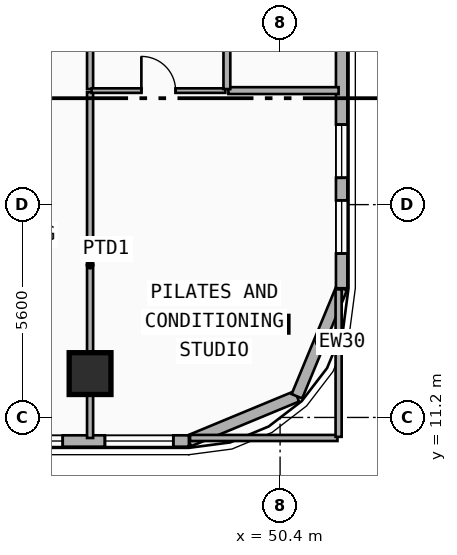
"""IFC4 building model, lengths in metres.
Left out: names, types, materials, properties, quantities, classifications, styles, units other than length and angle.
Written with IfcOpenShell. Run it as: python <this file> out.ifc"""

import sys

from ifc_helpers import new_model, si_unit, direction, frame, frame_2d, origin, origin_2d, place, context, subcontext, project, spatial, rectangle, i_section, extrude, element, fill, save


model = new_model("IFC4")
c1 = context("Model", 3, precision=1e-05, world=origin(), true_north=direction((0.0, 1.0)))
c2 = subcontext(c1, "Body", "Model", "MODEL_VIEW")
j1 = project(units=[si_unit("LENGTHUNIT", "METRE"), si_unit("PLANEANGLEUNIT", "RADIAN")], contexts=[c1])
p1 = place(None, origin())
s1 = spatial("IfcSite", under=j1, at=p1, CompositionType="ELEMENT")
p2 = place(p1, origin())
s2 = spatial("IfcBuilding", under=s1, at=p2, CompositionType="ELEMENT")
p3 = place(p2, frame((0.0, 0.0, 151.9)))
s3 = spatial("IfcBuildingStorey", under=s2, at=p3, CompositionType="ELEMENT", Elevation=151.9)
p4 = place(p3, frame((45.4, 12.463, 0.0), z_axis=(0.0, -0.0902702026, 0.995917311087), x_axis=(1.0, 0.0, 0.0)))
e1 = element("IfcColumn", 1, at=p4, inside=s3, PredefinedType="COLUMN", context=c2, shape_type="SweptSolid", body=[
    extrude(rectangle(XDim=1.1, YDim=1.1, at=origin_2d()), origin(), (0.0, 0.0, 1.0), 3.565),
])
p5 = place(p3, frame((50.4, 13.75, 0.0), z_axis=(0.0, -0.079930493943, 0.996800439475), x_axis=(1.0, 0.0, 0.0)))
e2 = element("IfcColumn", 2, at=p5, inside=s3, PredefinedType="COLUMN", context=c2, shape_type="SweptSolid", body=[
    extrude(i_section(OverallWidth=0.413, OverallDepth=0.415, WebThickness=0.03, FlangeThickness=0.047, FilletRadius=0.015, at=origin_2d()), origin(), (0.0, 0.0, 1.0), 3.562),
])
p6 = place(p3, frame((50.843, 11.757, 0.0), z_axis=(0.0, 0.0, 1.0), x_axis=(-0.92389884758, -0.382636798336, 0.0)))
e3 = element("IfcWall", 3, at=p6, inside=s3, PredefinedType="SOLIDWALL", context=c2, shape_type="SweptSolid", body=[
    extrude(rectangle(XDim=3.077, YDim=0.3, at=frame_2d((1.538, 0.0))), origin(), (0.0, 0.0, 1.0), 3.29),
])
p7 = place(p3, frame((52.02, 14.6, 0.0), z_axis=(0.0, 0.0, 1.0), x_axis=(-0.382676475685, -0.923882414032, 0.0)))
e4 = element("IfcWall", 4, at=p7, inside=s3, PredefinedType="SOLIDWALL", context=c2, shape_type="SweptSolid", body=[
    extrude(rectangle(XDim=3.077, YDim=0.3, at=frame_2d((1.539, 0.0))), origin(), (0.0, 0.0, 1.0), 3.29),
])
p8 = place(p3, frame((52.02, 37.6, 0.0), z_axis=(0.0, 0.0, 1.0), x_axis=(0.0, -1.0, 0.0)))
e5 = element("IfcWall", 5, at=p8, inside=s3, PredefinedType="SOLIDWALL", context=c2, shape_type="SweptSolid", body=[
    extrude(rectangle(XDim=23.0, YDim=0.3, at=frame_2d((11.5, 0.0))), origin(), (0.0, 0.0, 1.0), 3.29),
])
p9 = place(p8, frame((2.513, 0.0, 0.34)))
e6 = element("IfcOpeningElement", 6, at=p9, cuts=e5, PredefinedType="OPENING", context=c2, shape_type="SweptSolid", body=[
    extrude(rectangle(XDim=1.4, YDim=2.1, at=frame_2d((0.7, 1.05))), frame((0.0, 0.16, 0.0), z_axis=(0.0, -1.0, 0.0), x_axis=(1.0, 0.0, 0.0)), (0.0, 0.0, 1.0), 0.32),
])
p10 = place(p8, frame((6.107, 0.0, 0.34)))
e7 = element("IfcOpeningElement", 7, at=p10, cuts=e5, PredefinedType="OPENING", context=c2, shape_type="SweptSolid", body=[
    extrude(rectangle(XDim=1.4, YDim=2.1, at=frame_2d((0.7, 1.05))), frame((0.0, 0.16, 0.0), z_axis=(0.0, -1.0, 0.0), x_axis=(1.0, 0.0, 0.0)), (0.0, 0.0, 1.0), 0.32),
])
p11 = place(p8, frame((18.693, 0.0, 0.34)))
e8 = element("IfcOpeningElement", 8, at=p11, cuts=e5, PredefinedType="OPENING", context=c2, shape_type="SweptSolid", body=[
    extrude(rectangle(XDim=1.4, YDim=2.1, at=frame_2d((0.7, 1.05))), frame((0.0, 0.16, 0.0), z_axis=(0.0, -1.0, 0.0), x_axis=(1.0, 0.0, 0.0)), (0.0, 0.0, 1.0), 0.32),
])
p12 = place(p8, frame((20.687, 0.0, 0.34)))
e9 = element("IfcOpeningElement", 9, at=p12, cuts=e5, PredefinedType="OPENING", context=c2, shape_type="SweptSolid", body=[
    extrude(rectangle(XDim=1.4, YDim=2.1, at=frame_2d((0.7, 1.05))), frame((0.0, 0.16, 0.0), z_axis=(0.0, -1.0, 0.0), x_axis=(1.0, 0.0, 0.0)), (0.0, 0.0, 1.0), 0.32),
])
p13 = place(p3, frame((48.0, 10.58, 0.0), z_axis=(0.0, 0.0, 1.0), x_axis=(-1.0, 0.0, 0.0)))
e10 = element("IfcWall", 10, at=p13, inside=s3, PredefinedType="SOLIDWALL", context=c2, shape_type="SweptSolid", body=[
    extrude(rectangle(XDim=38.4, YDim=0.3, at=frame_2d((19.2, 0.0))), origin(), (0.0, 0.0, 1.0), 3.29),
])
p14 = place(p13, frame((36.19, 0.0, 0.34)))
e11 = element("IfcOpeningElement", 11, at=p14, cuts=e10, PredefinedType="OPENING", context=c2, shape_type="SweptSolid", body=[
    extrude(rectangle(XDim=1.8, YDim=1.8, at=frame_2d((0.9, 0.9))), frame((0.0, 0.16, 0.0), z_axis=(0.0, -1.0, 0.0), x_axis=(1.0, 0.0, 0.0)), (0.0, 0.0, 1.0), 0.32),
])
p15 = place(p13, frame((33.7, 0.0, 0.34)))
e12 = element("IfcOpeningElement", 12, at=p15, cuts=e10, PredefinedType="OPENING", context=c2, shape_type="SweptSolid", body=[
    extrude(rectangle(XDim=1.8, YDim=1.8, at=frame_2d((0.9, 0.9))), frame((0.0, 0.16, 0.0), z_axis=(0.0, -1.0, 0.0), x_axis=(1.0, 0.0, 0.0)), (0.0, 0.0, 1.0), 0.32),
])
p16 = place(p13, frame((25.5, 0.0, 0.68)))
e13 = element("IfcOpeningElement", 13, at=p16, cuts=e10, PredefinedType="OPENING", context=c2, shape_type="SweptSolid", body=[
    extrude(rectangle(XDim=1.2, YDim=1.5, at=frame_2d((0.6, 0.75))), frame((0.0, 0.16, 0.0), z_axis=(0.0, -1.0, 0.0), x_axis=(1.0, 0.0, 0.0)), (0.0, 0.0, 1.0), 0.32),
])
p17 = place(p13, frame((21.15, 0.0, 0.65)))
e14 = element("IfcOpeningElement", 14, at=p17, cuts=e10, PredefinedType="OPENING", context=c2, shape_type="SweptSolid", body=[
    extrude(rectangle(XDim=2.1, YDim=2.1, at=frame_2d((1.05, 1.05))), frame((0.0, 0.16, 0.0), z_axis=(0.0, -1.0, 0.0), x_axis=(1.0, 0.0, 0.0)), (0.0, 0.0, 1.0), 0.32),
])
p18 = place(p13, frame((14.375, 0.0, 0.65)))
e15 = element("IfcOpeningElement", 15, at=p18, cuts=e10, PredefinedType="OPENING", context=c2, shape_type="SweptSolid", body=[
    extrude(rectangle(XDim=2.1, YDim=2.1, at=frame_2d((1.05, 1.05))), frame((0.0, 0.16, 0.0), z_axis=(0.0, -1.0, 0.0), x_axis=(1.0, 0.0, 0.0)), (0.0, 0.0, 1.0), 0.32),
])
p19 = place(p13, frame((3.32, 0.0, 1.05)))
e16 = element("IfcOpeningElement", 16, at=p19, cuts=e10, PredefinedType="OPENING", context=c2, shape_type="SweptSolid", body=[
    extrude(rectangle(XDim=1.2, YDim=1.5, at=frame_2d((0.6, 0.75))), frame((0.0, 0.16, 0.0), z_axis=(0.0, -1.0, 0.0), x_axis=(1.0, 0.0, 0.0)), (0.0, 0.0, 1.0), 0.32),
])
p20 = place(p13, frame((0.41, 0.0, 0.34)))
e17 = element("IfcOpeningElement", 17, at=p20, cuts=e10, PredefinedType="OPENING", context=c2, shape_type="SweptSolid", body=[
    extrude(rectangle(XDim=1.8, YDim=1.8, at=frame_2d((0.9, 0.9))), frame((0.0, 0.16, 0.0), z_axis=(0.0, -1.0, 0.0), x_axis=(1.0, 0.0, 0.0)), (0.0, 0.0, 1.0), 0.32),
])
p21 = place(p3, frame((45.4, 10.66, 0.0), z_axis=(0.0, 0.0, 1.0), x_axis=(0.0, 1.0, 0.0)))
e18 = element("IfcWall", 18, at=p21, inside=s3, PredefinedType="PARTITIONING", context=c2, shape_type="SweptSolid", body=[
    extrude(rectangle(XDim=9.1, YDim=0.16, at=frame_2d((4.55, 0.0))), origin(), (0.0, 0.0, 1.0), 2.36),
])
p22 = place(p3, frame((45.4, 19.84, 0.0), z_axis=(0.0, 0.0, 1.0), x_axis=(0.0, 1.0, 0.0)))
e19 = element("IfcWall", 19, at=p22, inside=s3, PredefinedType="PARTITIONING", context=c2, shape_type="SweptSolid", body=[
    extrude(rectangle(XDim=5.67, YDim=0.16, at=frame_2d((2.835, 0.0))), origin(), (0.0, 0.0, 1.0), 2.36),
])
p23 = place(p3, frame((45.44, 19.8, 0.0), z_axis=(0.0, 0.0, 1.0), x_axis=(1.0, 0.0, 0.0)))
e20 = element("IfcWall", 20, at=p23, inside=s3, PredefinedType="PARTITIONING", context=c2, shape_type="SweptSolid", body=[
    extrude(rectangle(XDim=3.52, YDim=0.12, at=frame_2d((1.76, 0.0))), origin(), (0.0, 0.0, 1.0), 2.36),
])
p24 = place(p23, frame((1.31, 0.0, 0.0)))
e21 = element("IfcOpeningElement", 21, at=p24, cuts=e20, PredefinedType="OPENING", context=c2, shape_type="SweptSolid", body=[
    extrude(rectangle(XDim=0.9, YDim=2.1, at=frame_2d((0.45, 1.05))), frame((0.0, 0.07, 0.0), z_axis=(0.0, -1.0, 0.0), x_axis=(1.0, 0.0, 0.0)), (0.0, 0.0, 1.0), 0.14),
])
p25 = place(p3, frame((49.04, 19.8, 0.0), z_axis=(0.0, 0.0, 1.0), x_axis=(1.0, 0.0, 0.0)))
e22 = element("IfcWall", 22, at=p25, inside=s3, PredefinedType="PLUMBINGWALL", context=c2, shape_type="SweptSolid", body=[
    extrude(rectangle(XDim=2.9, YDim=0.18, at=frame_2d((1.45, 0.0))), origin(), (0.0, 0.0, 1.0), 2.62),
])
p26 = place(p3, frame((49.0, 19.84, 0.0), z_axis=(0.0, 0.0, 1.0), x_axis=(0.0, 1.0, 0.0)))
e23 = element("IfcWall", 23, at=p26, inside=s3, PredefinedType="PLUMBINGWALL", context=c2, shape_type="SweptSolid", body=[
    extrude(rectangle(XDim=5.67, YDim=0.18, at=frame_2d((2.835, 0.0))), origin(), (0.0, 0.0, 1.0), 2.77),
])
p27 = place(p3, frame((48.03, 10.66, 0.0), z_axis=(0.0, 0.0, 1.0), x_axis=(1.0, 0.0, 0.0)))
e24 = element("IfcWall", 24, at=p27, inside=s3, PredefinedType="PARTITIONING", context=c2, shape_type="SweptSolid", body=[
    extrude(rectangle(XDim=3.88, YDim=0.16, at=frame_2d((1.94, 0.0))), origin(), (0.0, 0.0, 1.0), 3.29),
])
p28 = place(p3, frame((51.94, 10.69, 0.0), z_axis=(0.0, 0.0, 1.0), x_axis=(0.0, 1.0, 0.0)))
e25 = element("IfcWall", 25, at=p28, inside=s3, PredefinedType="PARTITIONING", context=c2, shape_type="SweptSolid", body=[
    extrude(rectangle(XDim=3.88, YDim=0.16, at=frame_2d((1.94, 0.0))), origin(), (0.0, 0.0, 1.0), 3.29),
])
p29 = place(p11, origin())
e26 = element("IfcWindow", 26, at=p29, inside=s3, PartitioningType="SINGLE_PANEL", PredefinedType="WINDOW", context=c2, shape_type="SweptSolid", body=[
    extrude(rectangle(XDim=1.4, YDim=2.1, at=frame_2d((0.7, 1.05))), frame((0.0, 0.03, 0.0), z_axis=(0.0, -1.0, 0.0), x_axis=(1.0, 0.0, 0.0)), (0.0, 0.0, 1.0), 0.06),
])
fill(e8, e26)
p30 = place(p12, origin())
e27 = element("IfcWindow", 27, at=p30, inside=s3, PartitioningType="SINGLE_PANEL", PredefinedType="WINDOW", context=c2, shape_type="SweptSolid", body=[
    extrude(rectangle(XDim=1.4, YDim=2.1, at=frame_2d((0.7, 1.05))), frame((0.0, 0.03, 0.0), z_axis=(0.0, -1.0, 0.0), x_axis=(1.0, 0.0, 0.0)), (0.0, 0.0, 1.0), 0.06),
])
fill(e9, e27)
p31 = place(p19, origin())
e28 = element("IfcWindow", 28, at=p31, inside=s3, PartitioningType="SINGLE_PANEL", PredefinedType="WINDOW", context=c2, shape_type="SweptSolid", body=[
    extrude(rectangle(XDim=1.2, YDim=1.5, at=frame_2d((0.6, 0.75))), frame((0.0, 0.03, 0.0), z_axis=(0.0, -1.0, 0.0), x_axis=(1.0, 0.0, 0.0)), (0.0, 0.0, 1.0), 0.06),
])
fill(e16, e28)
p32 = place(p20, origin())
e29 = element("IfcWindow", 29, at=p32, inside=s3, PartitioningType="SINGLE_PANEL", PredefinedType="WINDOW", context=c2, shape_type="SweptSolid", body=[
    extrude(rectangle(XDim=1.8, YDim=1.8, at=frame_2d((0.9, 0.9))), frame((0.0, 0.03, 0.0), z_axis=(0.0, -1.0, 0.0), x_axis=(1.0, 0.0, 0.0)), (0.0, 0.0, 1.0), 0.06),
])
fill(e17, e29)
p33 = place(p24, origin())
e30 = element("IfcDoor", 30, at=p33, inside=s3, OperationType="SINGLE_SWING_LEFT", PredefinedType="DOOR", context=c2, shape_type="SweptSolid", body=[
    extrude(rectangle(XDim=0.9, YDim=2.1, at=frame_2d((0.45, 1.05))), frame((0.0, 0.025, 0.0), z_axis=(0.0, -1.0, 0.0), x_axis=(1.0, 0.0, 0.0)), (0.0, 0.0, 1.0), 0.05),
])
fill(e21, e30)
save(model, sys.argv[1])
